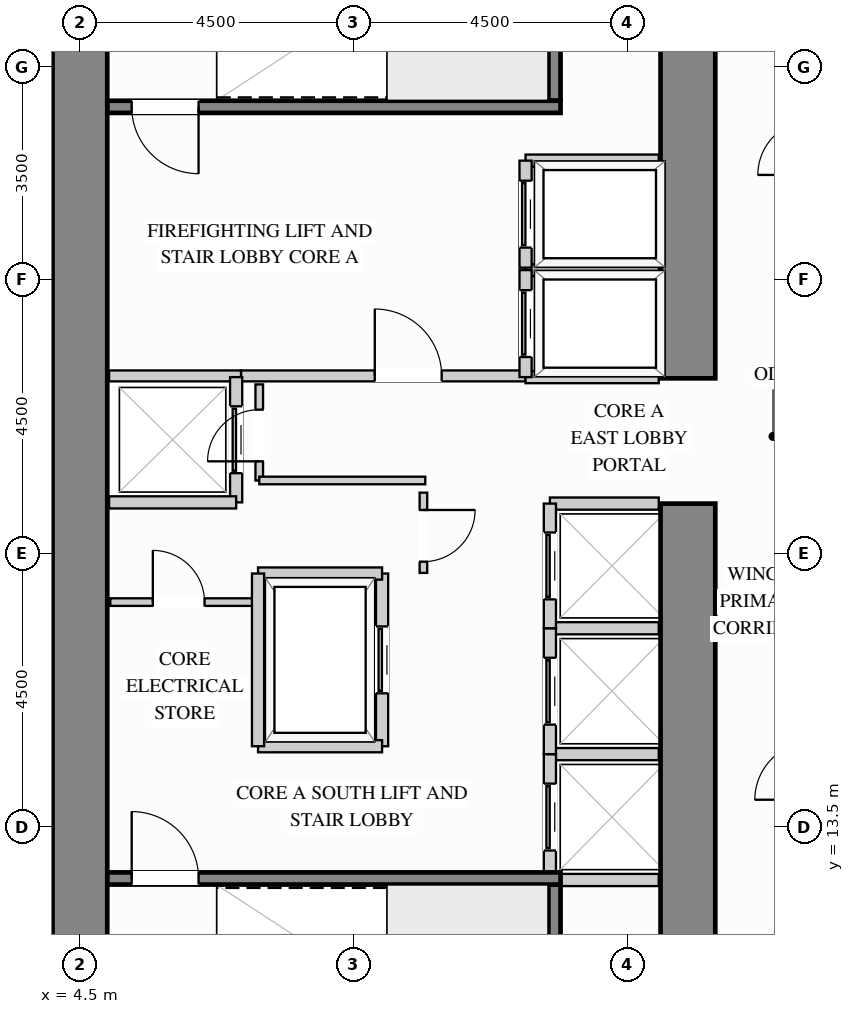
"""IFC4 building model, lengths in metres.
Left out: names, types, materials, properties, quantities, classifications, styles, units other than length and angle.
Written with IfcOpenShell. Run it as: python <this file> out.ifc"""

import sys

from ifc_helpers import new_model, si_unit, direction, frame, frame_2d, origin, place, context, subcontext, project, spatial, rectangle, extrude, source, transform, mapped, element, fill, save


model = new_model("IFC4")
c1 = context("Model", 3, precision=1e-05, world=origin(), true_north=direction((0.0, 1.0)))
c2 = subcontext(c1, "Body", "Model", "MODEL_VIEW")
j1 = project(units=[si_unit("LENGTHUNIT", "METRE"), si_unit("PLANEANGLEUNIT", "RADIAN")], contexts=[c1])
p1 = place(None, origin())
s1 = spatial("IfcSite", under=j1, at=p1, CompositionType="ELEMENT")
p2 = place(p1, origin())
s2 = spatial("IfcBuilding", under=s1, at=p2, CompositionType="ELEMENT")
p3 = place(p2, frame((0.0, 0.0, 65.7)))
s3 = spatial("IfcBuildingStorey", under=s2, at=p3, CompositionType="ELEMENT", Elevation=65.7)
m1 = source(origin(), c2, "Body", "SweptSolid", [
    extrude(rectangle(XDim=9.87, YDim=0.9, at=frame_2d((4.935, 0.0))), origin(), (0.0, 0.0, 1.0), 3.38),
])
p4 = place(p3, frame((14.5, 8.95, 0.0), z_axis=(0.0, 0.0, 1.0), x_axis=(0.0, 1.0, 0.0)))
e1 = element("IfcWall", 1, at=p4, inside=s3, PredefinedType="SHEAR", context=c2, shape_type="MappedRepresentation", body=[
    mapped(m1, transform((0.0, 0.0, 0.0), x_axis=(1.0, 0.0, 0.0), y_axis=(0.0, 1.0, 0.0), z_axis=(0.0, 0.0, 1.0))),
])
m2 = source(origin(), c2, "Body", "SweptSolid", [
    extrude(rectangle(XDim=8.17, YDim=0.9, at=frame_2d((4.085, 0.0))), origin(), (0.0, 0.0, 1.0), 3.38),
])
p5 = place(p3, frame((14.5, 20.88, 0.0), z_axis=(0.0, 0.0, 1.0), x_axis=(0.0, 1.0, 0.0)))
e2 = element("IfcWall", 2, at=p5, inside=s3, PredefinedType="SHEAR", context=c2, shape_type="MappedRepresentation", body=[
    mapped(m2, transform((0.0, 0.0, 0.0), x_axis=(1.0, 0.0, 0.0), y_axis=(0.0, 1.0, 0.0), z_axis=(0.0, 0.0, 1.0))),
])
m3 = source(origin(), c2, "Body", "SweptSolid", [
    extrude(rectangle(XDim=20.1, YDim=0.9, at=frame_2d((10.05, 0.0))), origin(), (0.0, 0.0, 1.0), 3.38),
])
p6 = place(p3, frame((4.5, 8.95, 0.0), z_axis=(0.0, 0.0, 1.0), x_axis=(0.0, 1.0, 0.0)))
e3 = element("IfcWall", 3, at=p6, inside=s3, PredefinedType="SHEAR", context=c2, shape_type="MappedRepresentation", body=[
    mapped(m3, transform((0.0, 0.0, 0.0), x_axis=(1.0, 0.0, 0.0), y_axis=(0.0, 1.0, 0.0), z_axis=(0.0, 0.0, 1.0))),
])
p7 = place(p3, frame((7.15, 20.92, 0.0), z_axis=(0.0, 0.0, 1.0), x_axis=(1.0, 0.0, 0.0)))
e4 = element("IfcWall", 4, at=p7, inside=s3, PredefinedType="PARTITIONING", context=c2, shape_type="SweptSolid", body=[
    extrude(rectangle(XDim=4.68, YDim=0.18, at=frame_2d((2.34, 0.0))), origin(), (0.0, 0.0, 1.0), 3.365),
])
p8 = place(p7, frame((2.2, 0.0, 0.0)))
e5 = element("IfcOpeningElement", 5, at=p8, cuts=e4, PredefinedType="OPENING", context=c2, shape_type="SweptSolid", body=[
    extrude(rectangle(XDim=1.1, YDim=2.15, at=frame_2d((0.55, 1.075))), frame((0.0, 0.1, 0.0), z_axis=(0.0, -1.0, 0.0), x_axis=(1.0, 0.0, 0.0)), (0.0, 0.0, 1.0), 0.2),
])
m4 = source(origin(), c2, "Body", "SweptSolid", [
    extrude(rectangle(XDim=2.17, YDim=0.18, at=frame_2d((1.085, 0.0))), origin(), (0.0, 0.0, 1.0), 3.365),
])
p9 = place(p3, frame((4.98, 20.92, 0.0), z_axis=(0.0, 0.0, 1.0), x_axis=(1.0, 0.0, 0.0)))
e6 = element("IfcWall", 6, at=p9, inside=s3, PredefinedType="PARTITIONING", context=c2, shape_type="MappedRepresentation", body=[
    mapped(m4, transform((0.0, 0.0, 0.0), x_axis=(1.0, 0.0, 0.0), y_axis=(0.0, 1.0, 0.0), z_axis=(0.0, 0.0, 1.0))),
])
p10 = place(p3, frame((10.15, 17.68, 0.0), z_axis=(0.0, 0.0, 1.0), x_axis=(0.0, 1.0, 0.0)))
e7 = element("IfcWall", 7, at=p10, inside=s3, PredefinedType="PARTITIONING", context=c2, shape_type="SweptSolid", body=[
    extrude(rectangle(XDim=1.32, YDim=0.125, at=frame_2d((0.66, 0.0))), origin(), (0.0, 0.0, 1.0), 3.365),
])
p11 = place(p10, frame((0.185, 0.0, 0.0)))
e8 = element("IfcOpeningElement", 8, at=p11, cuts=e7, PredefinedType="OPENING", context=c2, shape_type="SweptSolid", body=[
    extrude(rectangle(XDim=0.85, YDim=2.1, at=frame_2d((0.425, 1.05))), frame((0.0, 0.073, 0.0), z_axis=(0.0, -1.0, 0.0), x_axis=(1.0, 0.0, 0.0)), (0.0, 0.0, 1.0), 0.145),
])
p12 = place(p3, frame((7.45, 19.2, 0.0), z_axis=(0.0, 0.0, 1.0), x_axis=(0.0, 1.0, 0.0)))
e9 = element("IfcWall", 9, at=p12, inside=s3, PredefinedType="PARTITIONING", context=c2, shape_type="SweptSolid", body=[
    extrude(rectangle(XDim=1.58, YDim=0.125, at=frame_2d((0.79, 0.0))), origin(), (0.0, 0.0, 1.0), 3.365),
])
p13 = place(p12, frame((0.315, 0.0, 0.0)))
e10 = element("IfcOpeningElement", 10, at=p13, cuts=e9, PredefinedType="OPENING", context=c2, shape_type="SweptSolid", body=[
    extrude(rectangle(XDim=0.85, YDim=2.1, at=frame_2d((0.425, 1.05))), frame((0.0, 0.073, 0.0), z_axis=(0.0, -1.0, 0.0), x_axis=(1.0, 0.0, 0.0)), (0.0, 0.0, 1.0), 0.145),
])
m5 = source(origin(), c2, "Body", "SweptSolid", [
    extrude(rectangle(XDim=2.73, YDim=0.125, at=frame_2d((1.365, 0.0))), origin(), (0.0, 0.0, 1.0), 3.365),
])
p14 = place(p3, frame((7.45, 19.2, 0.0), z_axis=(0.0, 0.0, 1.0), x_axis=(1.0, 0.0, 0.0)))
e11 = element("IfcWall", 11, at=p14, inside=s3, PredefinedType="PARTITIONING", context=c2, shape_type="MappedRepresentation", body=[
    mapped(m5, transform((0.0, 0.0, 0.0), x_axis=(1.0, 0.0, 0.0), y_axis=(0.0, 1.0, 0.0), z_axis=(0.0, 0.0, 1.0))),
])
p15 = place(p3, frame((5.0, 17.2, 0.0), z_axis=(0.0, 0.0, 1.0), x_axis=(1.0, 0.0, 0.0)))
e12 = element("IfcWall", 12, at=p15, inside=s3, PredefinedType="PARTITIONING", context=c2, shape_type="SweptSolid", body=[
    extrude(rectangle(XDim=2.4, YDim=0.125, at=frame_2d((1.2, 0.0))), origin(), (0.0, 0.0, 1.0), 3.365),
])
p16 = place(p15, frame((0.7, 0.0, 0.0)))
e13 = element("IfcOpeningElement", 13, at=p16, cuts=e12, PredefinedType="OPENING", context=c2, shape_type="SweptSolid", body=[
    extrude(rectangle(XDim=0.85, YDim=2.1, at=frame_2d((0.425, 1.05))), frame((0.0, 0.073, 0.0), z_axis=(0.0, -1.0, 0.0), x_axis=(1.0, 0.0, 0.0)), (0.0, 0.0, 1.0), 0.145),
])
m6 = source(origin(), c2, "Body", "SweptSolid", [
    extrude(rectangle(XDim=2.19, YDim=0.2, at=frame_2d((1.095, 0.0))), origin(), (0.0, 0.0, 1.0), 3.365),
])
for number, where, z_axis, x_axis in (
    (14, (11.83, 22.66, 0.0), (0.0, 0.0, 1.0), (1.0, 0.0, 0.0)),
    (15, (11.83, 20.9, 0.0), (0.0, 0.0, 1.0), (1.0, 0.0, 0.0)),
):
    element("IfcWall", number, at=place(p3, frame(where, z_axis=z_axis, x_axis=x_axis)), inside=s3, PredefinedType="PARTITIONING", context=c2, shape_type="MappedRepresentation", body=[
        mapped(m6, transform((0.0, 0.0, 0.0), x_axis=(1.0, 0.0, 0.0), y_axis=(0.0, 1.0, 0.0), z_axis=(0.0, 0.0, 1.0))),
    ])
p17 = place(p3, frame((11.83, 20.9, 0.0), z_axis=(0.0, 0.0, 1.0), x_axis=(0.0, 1.0, 0.0)))
e16 = element("IfcWall", 16, at=p17, inside=s3, PredefinedType="PARTITIONING", context=c2, shape_type="SweptSolid", body=[
    extrude(rectangle(XDim=1.76, YDim=0.2, at=frame_2d((0.88, 0.0))), origin(), (0.0, 0.0, 1.0), 3.365),
])
p18 = place(p17, frame((0.33, 0.0, 0.0)))
e17 = element("IfcOpeningElement", 17, at=p18, cuts=e16, PredefinedType="OPENING", context=c2, shape_type="SweptSolid", body=[
    extrude(rectangle(XDim=1.1, YDim=2.2, at=frame_2d((0.55, 1.1))), frame((0.0, 0.11, 0.0), z_axis=(0.0, -1.0, 0.0), x_axis=(1.0, 0.0, 0.0)), (0.0, 0.0, 1.0), 0.22),
])
p19 = place(p3, frame((11.83, 24.46, 0.0), z_axis=(0.0, 0.0, 1.0), x_axis=(1.0, 0.0, 0.0)))
e18 = element("IfcWall", 18, at=p19, inside=s3, PredefinedType="PARTITIONING", context=c2, shape_type="MappedRepresentation", body=[
    mapped(m6, transform((0.0, 0.0, 0.0), x_axis=(1.0, 0.0, 0.0), y_axis=(0.0, 1.0, 0.0), z_axis=(0.0, 0.0, 1.0))),
])
p20 = place(p3, frame((11.83, 22.7, 0.0), z_axis=(0.0, 0.0, 1.0), x_axis=(0.0, 1.0, 0.0)))
e19 = element("IfcWall", 19, at=p20, inside=s3, PredefinedType="PARTITIONING", context=c2, shape_type="SweptSolid", body=[
    extrude(rectangle(XDim=1.76, YDim=0.2, at=frame_2d((0.88, 0.0))), origin(), (0.0, 0.0, 1.0), 3.365),
])
p21 = place(p20, frame((0.33, 0.0, 0.0)))
e20 = element("IfcOpeningElement", 20, at=p21, cuts=e19, PredefinedType="OPENING", context=c2, shape_type="SweptSolid", body=[
    extrude(rectangle(XDim=1.1, YDim=2.2, at=frame_2d((0.55, 1.1))), frame((0.0, 0.11, 0.0), z_axis=(0.0, -1.0, 0.0), x_axis=(1.0, 0.0, 0.0)), (0.0, 0.0, 1.0), 0.22),
])
m7 = source(origin(), c2, "Body", "SweptSolid", [
    extrude(rectangle(XDim=1.79, YDim=0.2, at=frame_2d((0.895, 0.0))), origin(), (0.0, 0.0, 1.0), 3.365),
])
for number, where, z_axis, x_axis in (
    (21, (12.23, 14.7, 0.0), (0.0, 0.0, 1.0), (1.0, 0.0, 0.0)),
    (22, (12.23, 12.63, 0.0), (0.0, 0.0, 1.0), (1.0, 0.0, 0.0)),
):
    element("IfcWall", number, at=place(p3, frame(where, z_axis=z_axis, x_axis=x_axis)), inside=s3, PredefinedType="PARTITIONING", context=c2, shape_type="MappedRepresentation", body=[
        mapped(m7, transform((0.0, 0.0, 0.0), x_axis=(1.0, 0.0, 0.0), y_axis=(0.0, 1.0, 0.0), z_axis=(0.0, 0.0, 1.0))),
    ])
p22 = place(p3, frame((12.23, 12.63, 0.0), z_axis=(0.0, 0.0, 1.0), x_axis=(0.0, 1.0, 0.0)))
e23 = element("IfcWall", 23, at=p22, inside=s3, PredefinedType="PARTITIONING", context=c2, shape_type="SweptSolid", body=[
    extrude(rectangle(XDim=2.07, YDim=0.2, at=frame_2d((1.035, 0.0))), origin(), (0.0, 0.0, 1.0), 3.365),
])
p23 = place(p22, frame((0.485, 0.0, 0.0)))
e24 = element("IfcOpeningElement", 24, at=p23, cuts=e23, PredefinedType="OPENING", context=c2, shape_type="SweptSolid", body=[
    extrude(rectangle(XDim=1.1, YDim=2.2, at=frame_2d((0.55, 1.1))), frame((0.0, 0.11, 0.0), z_axis=(0.0, -1.0, 0.0), x_axis=(1.0, 0.0, 0.0)), (0.0, 0.0, 1.0), 0.22),
])
p24 = place(p3, frame((12.23, 16.77, 0.0), z_axis=(0.0, 0.0, 1.0), x_axis=(1.0, 0.0, 0.0)))
e25 = element("IfcWall", 25, at=p24, inside=s3, PredefinedType="PARTITIONING", context=c2, shape_type="MappedRepresentation", body=[
    mapped(m7, transform((0.0, 0.0, 0.0), x_axis=(1.0, 0.0, 0.0), y_axis=(0.0, 1.0, 0.0), z_axis=(0.0, 0.0, 1.0))),
])
p25 = place(p3, frame((12.23, 14.7, 0.0), z_axis=(0.0, 0.0, 1.0), x_axis=(0.0, 1.0, 0.0)))
e26 = element("IfcWall", 26, at=p25, inside=s3, PredefinedType="PARTITIONING", context=c2, shape_type="SweptSolid", body=[
    extrude(rectangle(XDim=2.07, YDim=0.2, at=frame_2d((1.035, 0.0))), origin(), (0.0, 0.0, 1.0), 3.365),
])
p26 = place(p25, frame((0.485, 0.0, 0.0)))
e27 = element("IfcOpeningElement", 27, at=p26, cuts=e26, PredefinedType="OPENING", context=c2, shape_type="SweptSolid", body=[
    extrude(rectangle(XDim=1.1, YDim=2.2, at=frame_2d((0.55, 1.1))), frame((0.0, 0.11, 0.0), z_axis=(0.0, -1.0, 0.0), x_axis=(1.0, 0.0, 0.0)), (0.0, 0.0, 1.0), 0.22),
])
p27 = place(p3, frame((12.23, 18.82, 0.0), z_axis=(0.0, 0.0, 1.0), x_axis=(1.0, 0.0, 0.0)))
e28 = element("IfcWall", 28, at=p27, inside=s3, PredefinedType="PARTITIONING", context=c2, shape_type="MappedRepresentation", body=[
    mapped(m7, transform((0.0, 0.0, 0.0), x_axis=(1.0, 0.0, 0.0), y_axis=(0.0, 1.0, 0.0), z_axis=(0.0, 0.0, 1.0))),
])
p28 = place(p3, frame((12.23, 16.77, 0.0), z_axis=(0.0, 0.0, 1.0), x_axis=(0.0, 1.0, 0.0)))
e29 = element("IfcWall", 29, at=p28, inside=s3, PredefinedType="PARTITIONING", context=c2, shape_type="SweptSolid", body=[
    extrude(rectangle(XDim=2.05, YDim=0.2, at=frame_2d((1.025, 0.0))), origin(), (0.0, 0.0, 1.0), 3.365),
])
p29 = place(p28, frame((0.475, 0.0, 0.0)))
e30 = element("IfcOpeningElement", 30, at=p29, cuts=e29, PredefinedType="OPENING", context=c2, shape_type="SweptSolid", body=[
    extrude(rectangle(XDim=1.1, YDim=2.2, at=frame_2d((0.55, 1.1))), frame((0.0, 0.11, 0.0), z_axis=(0.0, -1.0, 0.0), x_axis=(1.0, 0.0, 0.0)), (0.0, 0.0, 1.0), 0.22),
])
p30 = place(p3, frame((7.07, 18.84, 0.0), z_axis=(0.0, 0.0, 1.0), x_axis=(0.0, 1.0, 0.0)))
e31 = element("IfcWall", 31, at=p30, inside=s3, PredefinedType="PARTITIONING", context=c2, shape_type="SweptSolid", body=[
    extrude(rectangle(XDim=2.06, YDim=0.2, at=frame_2d((1.03, 0.0))), origin(), (0.0, 0.0, 1.0), 3.365),
])
p31 = place(p30, frame((0.48, 0.0, 0.0)))
e32 = element("IfcOpeningElement", 32, at=p31, cuts=e31, PredefinedType="OPENING", context=c2, shape_type="SweptSolid", body=[
    extrude(rectangle(XDim=1.1, YDim=2.2, at=frame_2d((0.55, 1.1))), frame((0.0, 0.11, 0.0), z_axis=(0.0, -1.0, 0.0), x_axis=(1.0, 0.0, 0.0)), (0.0, 0.0, 1.0), 0.22),
])
m8 = source(origin(), c2, "Body", "SweptSolid", [
    extrude(rectangle(XDim=2.09, YDim=0.2, at=frame_2d((1.045, 0.0))), origin(), (0.0, 0.0, 1.0), 3.365),
])
p32 = place(p3, frame((4.98, 18.84, 0.0), z_axis=(0.0, 0.0, 1.0), x_axis=(1.0, 0.0, 0.0)))
e33 = element("IfcWall", 33, at=p32, inside=s3, PredefinedType="PARTITIONING", context=c2, shape_type="MappedRepresentation", body=[
    mapped(m8, transform((0.0, 0.0, 0.0), x_axis=(1.0, 0.0, 0.0), y_axis=(0.0, 1.0, 0.0), z_axis=(0.0, 0.0, 1.0))),
])
p33 = place(p3, frame((9.47, 14.83, 0.0), z_axis=(0.0, 0.0, 1.0), x_axis=(0.0, 1.0, 0.0)))
e34 = element("IfcWall", 34, at=p33, inside=s3, PredefinedType="PARTITIONING", context=c2, shape_type="SweptSolid", body=[
    extrude(rectangle(XDim=2.84, YDim=0.2, at=frame_2d((1.42, 0.0))), origin(), (0.0, 0.0, 1.0), 3.365),
])
p34 = place(p33, frame((0.87, 0.0, 0.0)))
e35 = element("IfcOpeningElement", 35, at=p34, cuts=e34, PredefinedType="OPENING", context=c2, shape_type="SweptSolid", body=[
    extrude(rectangle(XDim=1.1, YDim=2.2, at=frame_2d((0.55, 1.1))), frame((0.0, 0.11, 0.0), z_axis=(0.0, -1.0, 0.0), x_axis=(1.0, 0.0, 0.0)), (0.0, 0.0, 1.0), 0.22),
])
m9 = source(origin(), c2, "Body", "SweptSolid", [
    extrude(rectangle(XDim=2.04, YDim=0.2, at=frame_2d((1.02, 0.0))), origin(), (0.0, 0.0, 1.0), 3.365),
])
for number, where, z_axis, x_axis in (
    (36, (7.43, 17.67, 0.0), (0.0, 0.0, 1.0), (1.0, 0.0, 0.0)),
    (37, (7.43, 14.83, 0.0), (0.0, 0.0, 1.0), (1.0, 0.0, 0.0)),
):
    element("IfcWall", number, at=place(p3, frame(where, z_axis=z_axis, x_axis=x_axis)), inside=s3, PredefinedType="PARTITIONING", context=c2, shape_type="MappedRepresentation", body=[
        mapped(m9, transform((0.0, 0.0, 0.0), x_axis=(1.0, 0.0, 0.0), y_axis=(0.0, 1.0, 0.0), z_axis=(0.0, 0.0, 1.0))),
    ])
m10 = source(origin(), c2, "Body", "SweptSolid", [
    extrude(rectangle(XDim=2.84, YDim=0.2, at=frame_2d((1.42, 0.0))), origin(), (0.0, 0.0, 1.0), 3.365),
])
p35 = place(p3, frame((7.43, 14.83, 0.0), z_axis=(0.0, 0.0, 1.0), x_axis=(0.0, 1.0, 0.0)))
e38 = element("IfcWall", 38, at=p35, inside=s3, PredefinedType="PARTITIONING", context=c2, shape_type="MappedRepresentation", body=[
    mapped(m10, transform((0.0, 0.0, 0.0), x_axis=(1.0, 0.0, 0.0), y_axis=(0.0, 1.0, 0.0), z_axis=(0.0, 0.0, 1.0))),
])
m11 = source(origin(), c2, "Body", "SweptSolid", [
    extrude(rectangle(XDim=3.603, YDim=0.2, at=frame_2d((1.802, 0.0))), origin(), (0.0, 0.0, 1.0), 3.38),
])
p36 = place(p3, frame((12.305, 8.952, 0.0), z_axis=(0.0, 0.0, 1.0), x_axis=(0.0, 1.0, 0.0)))
e39 = element("IfcWall", 39, at=p36, inside=s3, PredefinedType="SHEAR", context=c2, shape_type="MappedRepresentation", body=[
    mapped(m11, transform((0.0, 0.0, 0.0), x_axis=(1.0, 0.0, 0.0), y_axis=(0.0, 1.0, 0.0), z_axis=(0.0, 0.0, 1.0))),
])
p37 = place(p3, frame((4.952, 12.655, 0.0), z_axis=(0.0, 0.0, 1.0), x_axis=(1.0, 0.0, 0.0)))
e40 = element("IfcWall", 40, at=p37, inside=s3, PredefinedType="SHEAR", context=c2, shape_type="SweptSolid", body=[
    extrude(rectangle(XDim=7.453, YDim=0.2, at=frame_2d((3.727, 0.0))), origin(), (0.0, 0.0, 1.0), 3.38),
])
p38 = place(p37, frame((0.4, 0.0, 0.0)))
e41 = element("IfcOpeningElement", 41, at=p38, cuts=e40, PredefinedType="OPENING", context=c2, shape_type="SweptSolid", body=[
    extrude(rectangle(XDim=1.1, YDim=2.15, at=frame_2d((0.55, 1.075))), frame((0.0, 0.11, 0.0), z_axis=(0.0, -1.0, 0.0), x_axis=(1.0, 0.0, 0.0)), (0.0, 0.0, 1.0), 0.22),
])
p39 = place(p3, frame((12.305, 25.445, 0.0), z_axis=(0.0, 0.0, 1.0), x_axis=(0.0, 1.0, 0.0)))
e42 = element("IfcWall", 42, at=p39, inside=s3, PredefinedType="SHEAR", context=c2, shape_type="MappedRepresentation", body=[
    mapped(m11, transform((0.0, 0.0, 0.0), x_axis=(1.0, 0.0, 0.0), y_axis=(0.0, 1.0, 0.0), z_axis=(0.0, 0.0, 1.0))),
])
p40 = place(p3, frame((4.952, 25.345, 0.0), z_axis=(0.0, 0.0, 1.0), x_axis=(1.0, 0.0, 0.0)))
e43 = element("IfcWall", 43, at=p40, inside=s3, PredefinedType="SHEAR", context=c2, shape_type="SweptSolid", body=[
    extrude(rectangle(XDim=7.453, YDim=0.2, at=frame_2d((3.727, 0.0))), origin(), (0.0, 0.0, 1.0), 3.38),
])
p41 = place(p40, frame((0.4, 0.0, 0.0)))
e44 = element("IfcOpeningElement", 44, at=p41, cuts=e43, PredefinedType="OPENING", context=c2, shape_type="SweptSolid", body=[
    extrude(rectangle(XDim=1.1, YDim=2.15, at=frame_2d((0.55, 1.075))), frame((0.0, 0.11, 0.0), z_axis=(0.0, -1.0, 0.0), x_axis=(1.0, 0.0, 0.0)), (0.0, 0.0, 1.0), 0.22),
])
m12 = source(origin(), c2, "Body", "SweptSolid", [
    extrude(rectangle(XDim=1.1, YDim=2.15, at=frame_2d((0.55, 1.075))), frame((0.0, 0.025, 0.0), z_axis=(0.0, -1.0, 0.0), x_axis=(1.0, 0.0, 0.0)), (0.0, 0.0, 1.0), 0.05),
])
p42 = place(p8, origin())
e45 = element("IfcDoor", 45, at=p42, inside=s3, OperationType="SINGLE_SWING_LEFT", PredefinedType="DOOR", context=c2, shape_type="MappedRepresentation", body=[
    mapped(m12, transform((0.0, 0.0, 0.0), x_axis=(1.0, 0.0, 0.0), y_axis=(0.0, 1.0, 0.0), z_axis=(0.0, 0.0, 1.0))),
])
fill(e5, e45)
m13 = source(origin(), c2, "Body", "SweptSolid", [
    extrude(rectangle(XDim=1.1, YDim=2.2, at=frame_2d((0.55, 1.1))), frame((0.0, 0.025, 0.0), z_axis=(0.0, -1.0, 0.0), x_axis=(1.0, 0.0, 0.0)), (0.0, 0.0, 1.0), 0.05),
])
p43 = place(p18, origin())
e46 = element("IfcDoor", 46, at=p43, inside=s3, OperationType="SLIDING_TO_LEFT", PredefinedType="DOOR", context=c2, shape_type="MappedRepresentation", body=[
    mapped(m13, transform((0.0, 0.0, 0.0), x_axis=(1.0, 0.0, 0.0), y_axis=(0.0, 1.0, 0.0), z_axis=(0.0, 0.0, 1.0))),
])
fill(e17, e46)
p44 = place(p21, origin())
e47 = element("IfcDoor", 47, at=p44, inside=s3, OperationType="SLIDING_TO_LEFT", PredefinedType="DOOR", context=c2, shape_type="MappedRepresentation", body=[
    mapped(m13, transform((0.0, 0.0, 0.0), x_axis=(1.0, 0.0, 0.0), y_axis=(0.0, 1.0, 0.0), z_axis=(0.0, 0.0, 1.0))),
])
fill(e20, e47)
p45 = place(p23, origin())
e48 = element("IfcDoor", 48, at=p45, inside=s3, OperationType="SLIDING_TO_LEFT", PredefinedType="DOOR", context=c2, shape_type="MappedRepresentation", body=[
    mapped(m13, transform((0.0, 0.0, 0.0), x_axis=(1.0, 0.0, 0.0), y_axis=(0.0, 1.0, 0.0), z_axis=(0.0, 0.0, 1.0))),
])
fill(e24, e48)
p46 = place(p26, origin())
e49 = element("IfcDoor", 49, at=p46, inside=s3, OperationType="SLIDING_TO_LEFT", PredefinedType="DOOR", context=c2, shape_type="MappedRepresentation", body=[
    mapped(m13, transform((0.0, 0.0, 0.0), x_axis=(1.0, 0.0, 0.0), y_axis=(0.0, 1.0, 0.0), z_axis=(0.0, 0.0, 1.0))),
])
fill(e27, e49)
p47 = place(p29, origin())
e50 = element("IfcDoor", 50, at=p47, inside=s3, OperationType="SLIDING_TO_LEFT", PredefinedType="DOOR", context=c2, shape_type="MappedRepresentation", body=[
    mapped(m13, transform((0.0, 0.0, 0.0), x_axis=(1.0, 0.0, 0.0), y_axis=(0.0, 1.0, 0.0), z_axis=(0.0, 0.0, 1.0))),
])
fill(e30, e50)
p48 = place(p31, origin())
e51 = element("IfcDoor", 51, at=p48, inside=s3, OperationType="SLIDING_TO_LEFT", PredefinedType="DOOR", context=c2, shape_type="MappedRepresentation", body=[
    mapped(m13, transform((0.0, 0.0, 0.0), x_axis=(1.0, 0.0, 0.0), y_axis=(0.0, 1.0, 0.0), z_axis=(0.0, 0.0, 1.0))),
])
fill(e32, e51)
p49 = place(p34, origin())
e52 = element("IfcDoor", 52, at=p49, inside=s3, OperationType="SLIDING_TO_LEFT", PredefinedType="DOOR", context=c2, shape_type="MappedRepresentation", body=[
    mapped(m13, transform((0.0, 0.0, 0.0), x_axis=(1.0, 0.0, 0.0), y_axis=(0.0, 1.0, 0.0), z_axis=(0.0, 0.0, 1.0))),
])
fill(e35, e52)
m14 = source(origin(), c2, "Body", "SweptSolid", [
    extrude(rectangle(XDim=0.85, YDim=2.1, at=frame_2d((0.425, 1.05))), frame((0.0, 0.025, 0.0), z_axis=(0.0, -1.0, 0.0), x_axis=(1.0, 0.0, 0.0)), (0.0, 0.0, 1.0), 0.05),
])
p50 = place(p11, origin())
e53 = element("IfcDoor", 53, at=p50, inside=s3, OperationType="SINGLE_SWING_RIGHT", PredefinedType="DOOR", context=c2, shape_type="MappedRepresentation", body=[
    mapped(m14, transform((0.0, 0.0, 0.0), x_axis=(1.0, 0.0, 0.0), y_axis=(0.0, 1.0, 0.0), z_axis=(0.0, 0.0, 1.0))),
])
fill(e8, e53)
p51 = place(p16, origin())
e54 = element("IfcDoor", 54, at=p51, inside=s3, OperationType="SINGLE_SWING_LEFT", PredefinedType="DOOR", context=c2, shape_type="MappedRepresentation", body=[
    mapped(m14, transform((0.0, 0.0, 0.0), x_axis=(1.0, 0.0, 0.0), y_axis=(0.0, 1.0, 0.0), z_axis=(0.0, 0.0, 1.0))),
])
fill(e13, e54)
p52 = place(p13, origin())
e55 = element("IfcDoor", 55, at=p52, inside=s3, OperationType="SINGLE_SWING_LEFT", PredefinedType="DOOR", context=c2, shape_type="MappedRepresentation", body=[
    mapped(m14, transform((0.0, 0.0, 0.0), x_axis=(1.0, 0.0, 0.0), y_axis=(0.0, 1.0, 0.0), z_axis=(0.0, 0.0, 1.0))),
])
fill(e10, e55)
m15 = source(origin(), c2, "Body", "SweptSolid", [
    extrude(rectangle(XDim=1.1, YDim=2.15, at=frame_2d((0.55, 1.075))), frame((0.0, 0.025, 0.0), z_axis=(0.0, -1.0, 0.0), x_axis=(1.0, 0.0, 0.0)), (0.0, 0.0, 1.0), 0.05),
])
p53 = place(p38, origin())
e56 = element("IfcDoor", 56, at=p53, inside=s3, OperationType="SINGLE_SWING_LEFT", PredefinedType="DOOR", context=c2, shape_type="MappedRepresentation", body=[
    mapped(m15, transform((0.0, 0.0, 0.0), x_axis=(1.0, 0.0, 0.0), y_axis=(0.0, 1.0, 0.0), z_axis=(0.0, 0.0, 1.0))),
])
fill(e41, e56)
p54 = place(p41, origin())
e57 = element("IfcDoor", 57, at=p54, inside=s3, OperationType="SINGLE_SWING_RIGHT", PredefinedType="DOOR", context=c2, shape_type="MappedRepresentation", body=[
    mapped(m15, transform((0.0, 0.0, 0.0), x_axis=(1.0, 0.0, 0.0), y_axis=(0.0, 1.0, 0.0), z_axis=(0.0, 0.0, 1.0))),
])
fill(e44, e57)
save(model, sys.argv[1])
